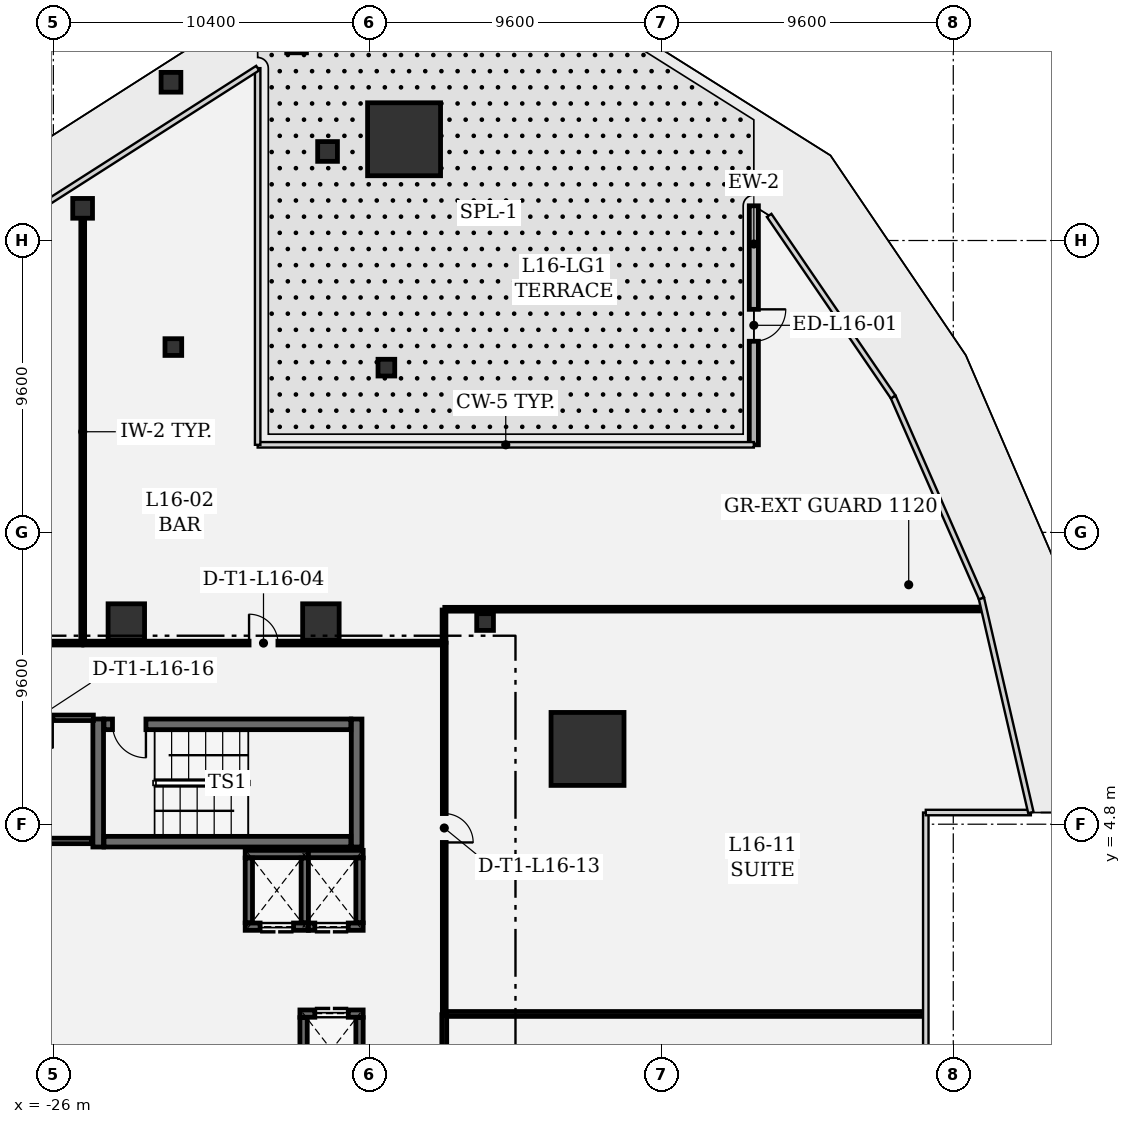
"""IFC4 building model, lengths in metres.
Left out: names, types, materials, properties, quantities, classifications, styles, units other than length and angle.
Written with IfcOpenShell. Run it as: python <this file> out.ifc"""

import sys

from ifc_helpers import new_model, si_unit, direction, frame, frame_2d, origin, origin_2d, place, context, subcontext, project, spatial, rectangle, extrude, element, fill, save


model = new_model("IFC4")
c1 = context("Model", 3, precision=1e-05, world=origin(), true_north=direction((0.0, 1.0)))
c2 = subcontext(c1, "Body", "Model", "MODEL_VIEW")
j1 = project(units=[si_unit("LENGTHUNIT", "METRE"), si_unit("PLANEANGLEUNIT", "RADIAN")], contexts=[c1])
p1 = place(None, origin())
s1 = spatial("IfcSite", under=j1, at=p1, CompositionType="ELEMENT")
p2 = place(p1, origin())
s2 = spatial("IfcBuilding", under=s1, at=p2, CompositionType="ELEMENT")
p3 = place(p2, frame((0.0, 0.0, 74.4)))
s3 = spatial("IfcBuildingStorey", under=s2, at=p3, CompositionType="ELEMENT", Elevation=74.4)
for number, where, z_axis, x_axis in (
    (1, (-8.43, 7.276, 0.0), (0.0, 0.0, 1.0), (1.0, 0.0, 0.0)),
    (2, (-14.464, 27.331, 0.0), (0.0, 0.0, 1.0), (1.0, 0.0, 0.0)),
):
    element("IfcColumn", number, at=place(p3, frame(where, z_axis=z_axis, x_axis=x_axis)), inside=s3, PredefinedType="COLUMN", context=c2, shape_type="SweptSolid", body=[
        extrude(rectangle(XDim=2.4, YDim=2.4, at=origin_2d()), origin(), (0.0, 0.0, 1.0), 4.2),
    ])
for number, where, z_axis, x_axis in (
    (3, (-23.6, 11.45, 0.0), (0.0, 0.0, 1.0), (1.0, 0.0, 0.0)),
    (4, (-17.2, 11.45, 0.0), (0.0, 0.0, 1.0), (1.0, 0.0, 0.0)),
):
    element("IfcColumn", number, at=place(p3, frame(where, z_axis=z_axis, x_axis=x_axis)), inside=s3, PredefinedType="COLUMN", context=c2, shape_type="SweptSolid", body=[
        extrude(rectangle(XDim=1.2, YDim=1.2, at=origin_2d()), origin(), (0.0, 0.0, 1.0), 4.2),
    ])
for number, where, z_axis, x_axis in (
    (5, (-22.131, 29.206, 0.0), (0.0, 0.0, 1.0), (1.0, 0.0, 0.0)),
    (6, (-18.0, 30.5, 0.0), (0.0, 0.0, 1.0), (1.0, 0.0, 0.0)),
    (7, (-25.038, 25.059, 0.0), (0.0, 0.0, 1.0), (1.0, 0.0, 0.0)),
    (8, (-16.981, 26.929, 0.0), (0.0, 0.0, 1.0), (1.0, 0.0, 0.0)),
):
    element("IfcColumn", number, at=place(p3, frame(where, z_axis=z_axis, x_axis=x_axis)), inside=s3, PredefinedType="COLUMN", context=c2, shape_type="SweptSolid", body=[
        extrude(rectangle(XDim=0.65, YDim=0.65, at=origin_2d()), origin(), (0.0, 0.0, 1.0), 4.2),
    ])
for number, where, z_axis, x_axis in (
    (9, (-22.053, 20.495, 0.0), (0.0, 0.0, 1.0), (1.0, 0.0, 0.0)),
    (10, (-15.046, 19.818, 0.0), (0.0, 0.0, 1.0), (1.0, 0.0, 0.0)),
    (11, (-11.8, 11.45, 0.0), (0.0, 0.0, 1.0), (1.0, 0.0, 0.0)),
):
    element("IfcColumn", number, at=place(p3, frame(where, z_axis=z_axis, x_axis=x_axis)), inside=s3, PredefinedType="COLUMN", context=c2, shape_type="SweptSolid", body=[
        extrude(rectangle(XDim=0.55, YDim=0.55, at=origin_2d()), origin(), (0.0, 0.0, 1.0), 4.2),
    ])
p4 = place(p3, frame((-2.96, 25.142, 0.0), z_axis=(0.0, 0.0, 1.0), x_axis=(0.0, -1.0, 0.0)))
e12 = element("IfcWall", 12, at=p4, inside=s3, PredefinedType="SOLIDWALL", context=c2, shape_type="SweptSolid", body=[
    extrude(rectangle(XDim=7.862, YDim=0.3, at=frame_2d((3.931, 0.0))), origin(), (0.0, 0.0, 1.0), 3.92),
])
p5 = place(p4, frame((3.406, 0.0, 0.0)))
e13 = element("IfcOpeningElement", 13, at=p5, cuts=e12, PredefinedType="OPENING", context=c2, shape_type="SweptSolid", body=[
    extrude(rectangle(XDim=1.05, YDim=2.2, at=frame_2d((0.525, 1.1))), frame((0.0, 0.16, 0.0), z_axis=(0.0, -1.0, 0.0), x_axis=(1.0, 0.0, 0.0)), (0.0, 0.0, 1.0), 0.32),
])
for number, where, z_axis, x_axis in (
    (14, (-24.525, 8.26, 0.0), (0.0, 0.0, 1.0), (0.0, -1.0, 0.0)),
    (15, (-16.025, 4.05, 0.0), (0.0, 0.0, 1.0), (0.0, 1.0, 0.0)),
):
    element("IfcWall", number, at=place(p3, frame(where, z_axis=z_axis, x_axis=x_axis)), inside=s3, PredefinedType="SHEAR", context=c2, shape_type="SweptSolid", body=[
        extrude(rectangle(XDim=4.21, YDim=0.35, at=frame_2d((2.105, 0.0))), origin(), (0.0, 0.0, 1.0), 3.92),
    ])
p6 = place(p3, frame((-24.335, 4.225, 0.0), z_axis=(0.0, 0.0, 1.0), x_axis=(1.0, 0.0, 0.0)))
e16 = element("IfcWall", 16, at=p6, inside=s3, PredefinedType="SHEAR", context=c2, shape_type="SweptSolid", body=[
    extrude(rectangle(XDim=8.12, YDim=0.35, at=frame_2d((4.06, 0.0))), origin(), (0.0, 0.0, 1.0), 3.92),
])
p7 = place(p3, frame((-16.215, 8.085, 0.0), z_axis=(0.0, 0.0, 1.0), x_axis=(-1.0, 0.0, 0.0)))
e17 = element("IfcWall", 17, at=p7, inside=s3, PredefinedType="SHEAR", context=c2, shape_type="SweptSolid", body=[
    extrude(rectangle(XDim=8.12, YDim=0.35, at=frame_2d((4.06, 0.0))), origin(), (0.0, 0.0, 1.0), 3.92),
])
p8 = place(p7, frame((6.74, 0.0, 0.0)))
e18 = element("IfcOpeningElement", 18, at=p8, cuts=e17, PredefinedType="OPENING", context=c2, shape_type="SweptSolid", body=[
    extrude(rectangle(XDim=1.1, YDim=2.2, at=frame_2d((0.55, 1.1))), frame((0.0, 0.185, 0.0), z_axis=(0.0, -1.0, 0.0), x_axis=(1.0, 0.0, 0.0)), (0.0, 0.0, 1.0), 0.37),
])
p9 = place(p3, frame((-17.61, 1.43, 0.0), z_axis=(0.0, 0.0, 1.0), x_axis=(-1.0, 0.0, 0.0)))
e19 = element("IfcWall", 19, at=p9, inside=s3, PredefinedType="SHEAR", context=c2, shape_type="SweptSolid", body=[
    extrude(rectangle(XDim=2.08, YDim=0.24, at=frame_2d((1.04, 0.0))), origin(), (0.0, 0.0, 1.0), 3.92),
])
p10 = place(p9, frame((0.49, 0.0, 0.0)))
e20 = element("IfcOpeningElement", 20, at=p10, cuts=e19, PredefinedType="OPENING", context=c2, shape_type="SweptSolid", body=[
    extrude(rectangle(XDim=1.1, YDim=2.2, at=frame_2d((0.55, 1.1))), frame((0.0, 0.13, 0.0), z_axis=(0.0, -1.0, 0.0), x_axis=(1.0, 0.0, 0.0)), (0.0, 0.0, 1.0), 0.26),
])
p11 = place(p3, frame((-19.69, 3.82, 0.0), z_axis=(0.0, 0.0, 1.0), x_axis=(1.0, 0.0, 0.0)))
e21 = element("IfcWall", 21, at=p11, inside=s3, PredefinedType="SHEAR", context=c2, shape_type="SweptSolid", body=[
    extrude(rectangle(XDim=2.08, YDim=0.24, at=frame_2d((1.04, 0.0))), origin(), (0.0, 0.0, 1.0), 3.92),
])
for number, where, z_axis, x_axis in (
    (22, (-19.57, 1.562, 0.0), (0.0, 0.0, 1.0), (0.0, 1.0, 0.0)),
    (23, (-17.73, 3.688, 0.0), (0.0, 0.0, 1.0), (0.0, -1.0, 0.0)),
):
    element("IfcWall", number, at=place(p3, frame(where, z_axis=z_axis, x_axis=x_axis)), inside=s3, PredefinedType="SHEAR", context=c2, shape_type="SweptSolid", body=[
        extrude(rectangle(XDim=2.126, YDim=0.24, at=frame_2d((1.063, 0.0))), origin(), (0.0, 0.0, 1.0), 3.92),
    ])
p12 = place(p3, frame((-15.81, 1.43, 0.0), z_axis=(0.0, 0.0, 1.0), x_axis=(-1.0, 0.0, 0.0)))
e24 = element("IfcWall", 24, at=p12, inside=s3, PredefinedType="SHEAR", context=c2, shape_type="SweptSolid", body=[
    extrude(rectangle(XDim=1.8, YDim=0.24, at=frame_2d((0.9, 0.0))), origin(), (0.0, 0.0, 1.0), 3.92),
])
p13 = place(p12, frame((0.49, 0.0, 0.0)))
e25 = element("IfcOpeningElement", 25, at=p13, cuts=e24, PredefinedType="OPENING", context=c2, shape_type="SweptSolid", body=[
    extrude(rectangle(XDim=1.1, YDim=2.2, at=frame_2d((0.55, 1.1))), frame((0.0, 0.13, 0.0), z_axis=(0.0, -1.0, 0.0), x_axis=(1.0, 0.0, 0.0)), (0.0, 0.0, 1.0), 0.26),
])
p14 = place(p3, frame((-17.61, 3.82, 0.0), z_axis=(0.0, 0.0, 1.0), x_axis=(1.0, 0.0, 0.0)))
e26 = element("IfcWall", 26, at=p14, inside=s3, PredefinedType="SHEAR", context=c2, shape_type="SweptSolid", body=[
    extrude(rectangle(XDim=1.8, YDim=0.24, at=frame_2d((0.9, 0.0))), origin(), (0.0, 0.0, 1.0), 3.92),
])
p15 = place(p3, frame((-15.93, 3.688, 0.0), z_axis=(0.0, 0.0, 1.0), x_axis=(0.0, -1.0, 0.0)))
e27 = element("IfcWall", 27, at=p15, inside=s3, PredefinedType="SHEAR", context=c2, shape_type="SweptSolid", body=[
    extrude(rectangle(XDim=2.126, YDim=0.24, at=frame_2d((1.063, 0.0))), origin(), (0.0, 0.0, 1.0), 3.92),
])
p16 = place(p3, frame((-17.89, -1.43, 0.0), z_axis=(0.0, 0.0, 1.0), x_axis=(1.0, 0.0, 0.0)))
e28 = element("IfcWall", 28, at=p16, inside=s3, PredefinedType="SHEAR", context=c2, shape_type="SweptSolid", body=[
    extrude(rectangle(XDim=2.08, YDim=0.24, at=frame_2d((1.04, 0.0))), origin(), (0.0, 0.0, 1.0), 3.92),
])
p17 = place(p16, frame((0.49, 0.0, 0.0)))
e29 = element("IfcOpeningElement", 29, at=p17, cuts=e28, PredefinedType="OPENING", context=c2, shape_type="SweptSolid", body=[
    extrude(rectangle(XDim=1.1, YDim=2.2, at=frame_2d((0.55, 1.1))), frame((0.0, 0.13, 0.0), z_axis=(0.0, -1.0, 0.0), x_axis=(1.0, 0.0, 0.0)), (0.0, 0.0, 1.0), 0.26),
])
for number, where, z_axis, x_axis in (
    (30, (-17.77, -3.688, 0.0), (0.0, 0.0, 1.0), (0.0, 1.0, 0.0)),
    (31, (-15.93, -1.562, 0.0), (0.0, 0.0, 1.0), (0.0, -1.0, 0.0)),
):
    element("IfcWall", number, at=place(p3, frame(where, z_axis=z_axis, x_axis=x_axis)), inside=s3, PredefinedType="SHEAR", context=c2, shape_type="SweptSolid", body=[
        extrude(rectangle(XDim=2.126, YDim=0.24, at=frame_2d((1.063, 0.0))), origin(), (0.0, 0.0, 1.0), 3.92),
    ])
p18 = place(p3, frame((-28.355, 4.25, 0.0), z_axis=(0.0, 0.0, 1.0), x_axis=(1.0, 0.0, 0.0)))
e32 = element("IfcWall", 32, at=p18, inside=s3, PredefinedType="PARTITIONING", context=c2, shape_type="SweptSolid", body=[
    extrude(rectangle(XDim=3.622, YDim=0.18, at=frame_2d((1.811, 0.0))), origin(), (0.0, 0.0, 1.0), 3.92),
])
p19 = place(p3, frame((-24.684, 8.3, 0.0), z_axis=(0.0, 0.0, 1.0), x_axis=(-1.0, 0.0, 0.0)))
e33 = element("IfcWall", 33, at=p19, inside=s3, PredefinedType="PARTITIONING", context=c2, shape_type="SweptSolid", body=[
    extrude(rectangle(XDim=3.671, YDim=0.18, at=frame_2d((1.835, 0.0))), origin(), (0.0, 0.0, 1.0), 3.92),
])
p20 = place(p19, frame((1.335, 0.0, 0.0)))
e34 = element("IfcOpeningElement", 34, at=p20, cuts=e33, PredefinedType="OPENING", context=c2, shape_type="SweptSolid", body=[
    extrude(rectangle(XDim=1.0, YDim=2.15, at=frame_2d((0.5, 1.075))), frame((0.0, 0.1, 0.0), z_axis=(0.0, -1.0, 0.0), x_axis=(1.0, 0.0, 0.0)), (0.0, 0.0, 1.0), 0.2),
])
p21 = place(p3, frame((-34.625, 10.758, 0.0), z_axis=(0.0, 0.0, 1.0), x_axis=(1.0, 0.0, 0.0)))
e35 = element("IfcWall", 35, at=p21, inside=s3, PredefinedType="PARTITIONING", context=c2, shape_type="SweptSolid", body=[
    extrude(rectangle(XDim=9.566, YDim=0.125, at=frame_2d((4.783, 0.0))), origin(), (0.0, 0.0, 1.0), 3.433),
])
p22 = place(p21, frame((4.308, 0.0, 0.0)))
e36 = element("IfcOpeningElement", 36, at=p22, cuts=e35, PredefinedType="OPENING", context=c2, shape_type="SweptSolid", body=[
    extrude(rectangle(XDim=0.95, YDim=2.15, at=frame_2d((0.475, 1.075))), frame((0.0, 0.073, 0.0), z_axis=(0.0, -1.0, 0.0), x_axis=(1.0, 0.0, 0.0)), (0.0, 0.0, 1.0), 0.145),
])
p23 = place(p3, frame((-25.034, 10.783, 0.0), z_axis=(0.0, 0.0, 1.0), x_axis=(0.0, 1.0, 0.0)))
e37 = element("IfcWall", 37, at=p23, inside=s3, PredefinedType="PARTITIONING", context=c2, shape_type="SweptSolid", body=[
    extrude(rectangle(XDim=13.885, YDim=0.125, at=frame_2d((6.943, 0.0))), origin(), (0.0, 0.0, 1.0), 3.433),
])
p24 = place(p3, frame((-25.001, 10.758, 0.0), z_axis=(0.0, 0.0, 1.0), x_axis=(1.0, 0.0, 0.0)))
e38 = element("IfcWall", 38, at=p24, inside=s3, PredefinedType="PARTITIONING", context=c2, shape_type="SweptSolid", body=[
    extrude(rectangle(XDim=11.826, YDim=0.125, at=frame_2d((5.913, 0.0))), origin(), (0.0, 0.0, 1.0), 2.957),
])
p25 = place(p24, frame((5.438, 0.0, 0.0)))
e39 = element("IfcOpeningElement", 39, at=p25, cuts=e38, PredefinedType="OPENING", context=c2, shape_type="SweptSolid", body=[
    extrude(rectangle(XDim=0.95, YDim=2.15, at=frame_2d((0.475, 1.075))), frame((0.0, 0.073, 0.0), z_axis=(0.0, -1.0, 0.0), x_axis=(1.0, 0.0, 0.0)), (0.0, 0.0, 1.0), 0.145),
])
p26 = place(p3, frame((-13.15, 11.846, 0.0), z_axis=(0.0, 0.0, 1.0), x_axis=(0.0, -1.0, 0.0)))
e40 = element("IfcWall", 40, at=p26, inside=s3, PredefinedType="PARTITIONING", context=c2, shape_type="SweptSolid", body=[
    extrude(rectangle(XDim=1.062, YDim=0.125, at=frame_2d((0.531, 0.0))), origin(), (0.0, 0.0, 1.0), 3.92),
])
p27 = place(p3, frame((-13.125, 11.871, 0.0), z_axis=(0.0, 0.0, 1.0), x_axis=(0.999999908086, 0.000428751188, 0.0)))
e41 = element("IfcWall", 41, at=p27, inside=s3, PredefinedType="PARTITIONING", context=c2, shape_type="SweptSolid", body=[
    extrude(rectangle(XDim=17.652, YDim=0.125, at=frame_2d((8.826, 0.0))), origin(), (0.0, 0.0, 1.0), 3.92),
])
p28 = place(p3, frame((2.616, -1.441, 0.0), z_axis=(0.0, 0.0, 1.0), x_axis=(-1.0, 0.0, 0.0)))
e42 = element("IfcWall", 42, at=p28, inside=s3, PredefinedType="PARTITIONING", context=c2, shape_type="SweptSolid", body=[
    extrude(rectangle(XDim=15.733, YDim=0.16, at=frame_2d((7.866, 0.0))), origin(), (0.0, 0.0, 1.0), 3.92),
])
p29 = place(p3, frame((-13.142, -1.466, 0.0), z_axis=(0.0, 0.0, 1.0), x_axis=(0.0, -1.0, 0.0)))
e43 = element("IfcWall", 43, at=p29, inside=s3, PredefinedType="PARTITIONING", context=c2, shape_type="SweptSolid", body=[
    extrude(rectangle(XDim=7.081, YDim=0.16, at=frame_2d((3.541, 0.0))), origin(), (0.0, 0.0, 1.0), 3.92),
])
p30 = place(p29, frame((2.99, 0.0, 0.0)))
e44 = element("IfcOpeningElement", 44, at=p30, cuts=e43, PredefinedType="OPENING", context=c2, shape_type="SweptSolid", body=[
    extrude(rectangle(XDim=1.1, YDim=2.15, at=frame_2d((0.55, 1.075))), frame((0.0, 0.09, 0.0), z_axis=(0.0, -1.0, 0.0), x_axis=(1.0, 0.0, 0.0)), (0.0, 0.0, 1.0), 0.18),
])
p31 = place(p3, frame((-13.142, 10.758, 0.0), z_axis=(0.0, 0.0, 1.0), x_axis=(0.0, -1.0, 0.0)))
e45 = element("IfcWall", 45, at=p31, inside=s3, PredefinedType="PARTITIONING", context=c2, shape_type="SweptSolid", body=[
    extrude(rectangle(XDim=12.167, YDim=0.125, at=frame_2d((6.083, 0.0))), origin(), (0.0, 0.0, 1.0), 3.92),
])
p32 = place(p31, frame((5.608, 0.0, 0.0)))
e46 = element("IfcOpeningElement", 46, at=p32, cuts=e45, PredefinedType="OPENING", context=c2, shape_type="SweptSolid", body=[
    extrude(rectangle(XDim=0.95, YDim=2.15, at=frame_2d((0.475, 1.075))), frame((0.0, 0.073, 0.0), z_axis=(0.0, -1.0, 0.0), x_axis=(1.0, 0.0, 0.0)), (0.0, 0.0, 1.0), 0.145),
])
p33 = place(p5, origin())
e47 = element("IfcDoor", 47, at=p33, inside=s3, OperationType="SINGLE_SWING_LEFT", PredefinedType="DOOR", context=c2, shape_type="SweptSolid", body=[
    extrude(rectangle(XDim=1.05, YDim=2.2, at=frame_2d((0.525, 1.1))), frame((0.0, 0.025, 0.0), z_axis=(0.0, -1.0, 0.0), x_axis=(1.0, 0.0, 0.0)), (0.0, 0.0, 1.0), 0.05),
])
fill(e13, e47)
p34 = place(p8, origin())
e48 = element("IfcDoor", 48, at=p34, inside=s3, OperationType="SINGLE_SWING_LEFT", PredefinedType="DOOR", context=c2, shape_type="SweptSolid", body=[
    extrude(rectangle(XDim=1.1, YDim=2.2, at=frame_2d((0.55, 1.1))), frame((0.0, 0.025, 0.0), z_axis=(0.0, -1.0, 0.0), x_axis=(1.0, 0.0, 0.0)), (0.0, 0.0, 1.0), 0.05),
])
fill(e18, e48)
p35 = place(p10, origin())
e49 = element("IfcDoor", 49, at=p35, inside=s3, OperationType="DOUBLE_DOOR_SLIDING", PredefinedType="DOOR", context=c2, shape_type="SweptSolid", body=[
    extrude(rectangle(XDim=1.1, YDim=2.2, at=frame_2d((0.55, 1.1))), frame((0.0, 0.025, 0.0), z_axis=(0.0, -1.0, 0.0), x_axis=(1.0, 0.0, 0.0)), (0.0, 0.0, 1.0), 0.05),
])
fill(e20, e49)
p36 = place(p13, origin())
e50 = element("IfcDoor", 50, at=p36, inside=s3, OperationType="DOUBLE_DOOR_SLIDING", PredefinedType="DOOR", context=c2, shape_type="SweptSolid", body=[
    extrude(rectangle(XDim=1.1, YDim=2.2, at=frame_2d((0.55, 1.1))), frame((0.0, 0.025, 0.0), z_axis=(0.0, -1.0, 0.0), x_axis=(1.0, 0.0, 0.0)), (0.0, 0.0, 1.0), 0.05),
])
fill(e25, e50)
p37 = place(p17, origin())
e51 = element("IfcDoor", 51, at=p37, inside=s3, OperationType="DOUBLE_DOOR_SLIDING", PredefinedType="DOOR", context=c2, shape_type="SweptSolid", body=[
    extrude(rectangle(XDim=1.1, YDim=2.2, at=frame_2d((0.55, 1.1))), frame((0.0, 0.025, 0.0), z_axis=(0.0, -1.0, 0.0), x_axis=(1.0, 0.0, 0.0)), (0.0, 0.0, 1.0), 0.05),
])
fill(e29, e51)
p38 = place(p25, origin())
e52 = element("IfcDoor", 52, at=p38, inside=s3, OperationType="SINGLE_SWING_LEFT", PredefinedType="DOOR", context=c2, shape_type="SweptSolid", body=[
    extrude(rectangle(XDim=0.95, YDim=2.15, at=frame_2d((0.475, 1.075))), frame((0.0, 0.025, 0.0), z_axis=(0.0, -1.0, 0.0), x_axis=(1.0, 0.0, 0.0)), (0.0, 0.0, 1.0), 0.05),
])
fill(e39, e52)
p39 = place(p32, origin())
e53 = element("IfcDoor", 53, at=p39, inside=s3, OperationType="SINGLE_SWING_RIGHT", PredefinedType="DOOR", context=c2, shape_type="SweptSolid", body=[
    extrude(rectangle(XDim=0.95, YDim=2.15, at=frame_2d((0.475, 1.075))), frame((0.0, 0.025, 0.0), z_axis=(0.0, -1.0, 0.0), x_axis=(1.0, 0.0, 0.0)), (0.0, 0.0, 1.0), 0.05),
])
fill(e46, e53)
p40 = place(p20, origin())
e54 = element("IfcDoor", 54, at=p40, inside=s3, OperationType="SINGLE_SWING_LEFT", PredefinedType="DOOR", context=c2, shape_type="SweptSolid", body=[
    extrude(rectangle(XDim=1.0, YDim=2.15, at=frame_2d((0.5, 1.075))), frame((0.0, 0.025, 0.0), z_axis=(0.0, -1.0, 0.0), x_axis=(1.0, 0.0, 0.0)), (0.0, 0.0, 1.0), 0.05),
])
fill(e34, e54)
save(model, sys.argv[1])
